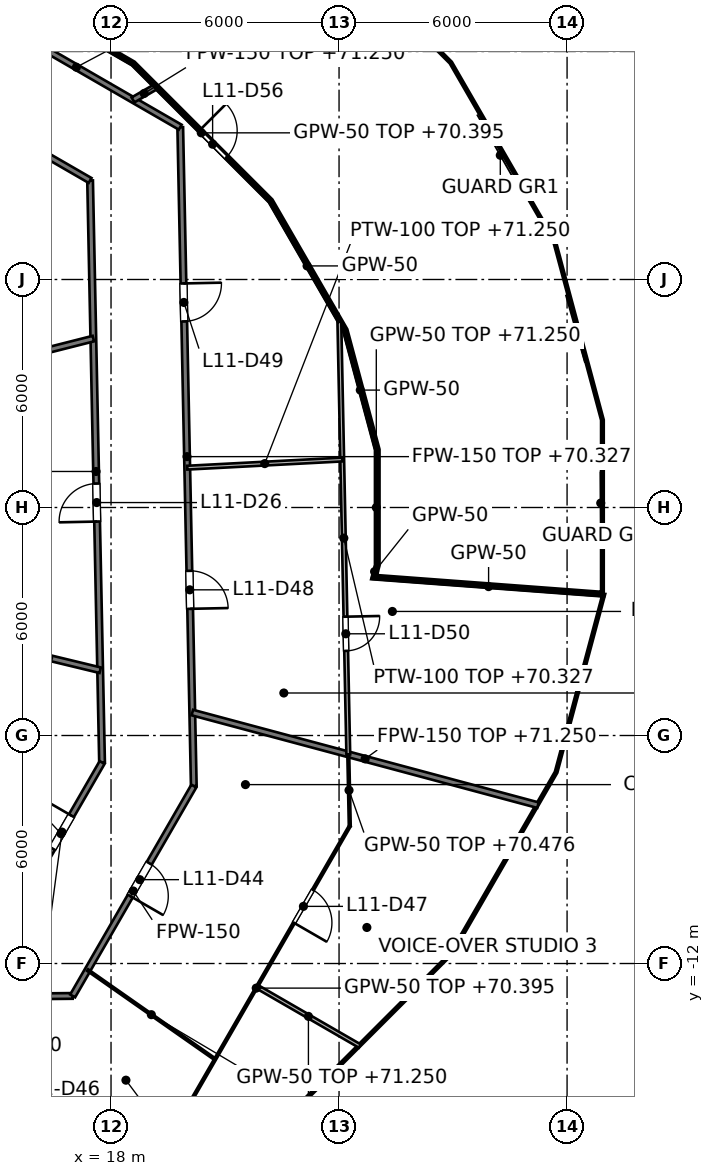
"""IFC4 building model, lengths in metres.
Left out: names, types, materials, properties, quantities, classifications, styles, units other than length and angle.
Written with IfcOpenShell. Run it as: python <this file> out.ifc"""

import sys

from ifc_helpers import new_model, si_unit, direction, frame, frame_2d, origin, place, context, subcontext, project, spatial, rectangle, extrude, element, fill, save


model = new_model("IFC4")
c1 = context("Model", 3, precision=1e-05, world=origin(), true_north=direction((0.0, 1.0)))
c2 = subcontext(c1, "Body", "Model", "MODEL_VIEW")
j1 = project(units=[si_unit("LENGTHUNIT", "METRE"), si_unit("PLANEANGLEUNIT", "RADIAN")], contexts=[c1])
p1 = place(None, origin())
s1 = spatial("IfcSite", under=j1, at=p1, CompositionType="ELEMENT")
p2 = place(p1, origin())
s2 = spatial("IfcBuilding", under=s1, at=p2, CompositionType="ELEMENT")
p3 = place(p2, frame((0.0, 0.0, 67.2)))
s3 = spatial("IfcBuildingStorey", under=s2, at=p3, CompositionType="ELEMENT", Elevation=67.2)
p4 = place(p3, frame((17.449, 8.606, 0.0), z_axis=(0.0, 0.0, 1.0), x_axis=(0.020558666055, -0.99978864829, 0.0)))
e1 = element("IfcWall", 1, at=p4, inside=s3, PredefinedType="PARTITIONING", context=c2, shape_type="SweptSolid", body=[
    extrude(rectangle(XDim=15.319, YDim=0.15, at=frame_2d((7.66, 0.0))), origin(), (0.0, 0.0, 1.0), 3.127),
])
p5 = place(p4, frame((7.978, 0.0, 0.0)))
e2 = element("IfcOpeningElement", 2, at=p5, cuts=e1, PredefinedType="OPENING", context=c2, shape_type="SweptSolid", body=[
    extrude(rectangle(XDim=1.0, YDim=2.1, at=frame_2d((0.5, 1.05))), frame((0.0, 0.075, 0.0), z_axis=(0.0, -1.0, 0.0), x_axis=(1.0, 0.0, 0.0)), (0.0, 0.0, 1.0), 0.15),
])
p6 = place(p3, frame((19.821, 10.008, 0.0), z_axis=(0.0, 0.0, 1.0), x_axis=(0.020552957546, -0.999788765658, 0.0)))
e3 = element("IfcWall", 3, at=p6, inside=s3, PredefinedType="PARTITIONING", context=c2, shape_type="SweptSolid", body=[
    extrude(rectangle(XDim=17.343, YDim=0.15, at=frame_2d((8.671, 0.0))), origin(), (0.0, 0.0, 1.0), 3.127),
])
p7 = place(p6, frame((11.677, 0.0, 0.0)))
e4 = element("IfcOpeningElement", 4, at=p7, cuts=e3, PredefinedType="OPENING", context=c2, shape_type="SweptSolid", body=[
    extrude(rectangle(XDim=1.0, YDim=2.1, at=frame_2d((0.5, 1.05))), frame((0.0, 0.075, 0.0), z_axis=(0.0, -1.0, 0.0), x_axis=(1.0, 0.0, 0.0)), (0.0, 0.0, 1.0), 0.15),
])
p8 = place(p6, frame((4.113, 0.0, 0.0)))
e5 = element("IfcOpeningElement", 5, at=p8, cuts=e3, PredefinedType="OPENING", context=c2, shape_type="SweptSolid", body=[
    extrude(rectangle(XDim=1.0, YDim=2.1, at=frame_2d((0.5, 1.05))), frame((0.0, 0.075, 0.0), z_axis=(0.0, -1.0, 0.0), x_axis=(1.0, 0.0, 0.0)), (0.0, 0.0, 1.0), 0.15),
])
p9 = place(p3, frame((13.724, 10.757, 0.0), z_axis=(0.0, 0.0, 1.0), x_axis=(0.86594264414, -0.500143316521, 0.0)))
e6 = element("IfcWall", 6, at=p9, inside=s3, PredefinedType="PARTITIONING", context=c2, shape_type="SweptSolid", body=[
    extrude(rectangle(XDim=4.302, YDim=0.15, at=frame_2d((2.151, 0.0))), origin(), (0.0, 0.0, 1.0), 3.195),
])
p10 = place(p9, frame((1.602, 0.0, 0.0)))
e7 = element("IfcOpeningElement", 7, at=p10, cuts=e6, PredefinedType="OPENING", context=c2, shape_type="SweptSolid", body=[
    extrude(rectangle(XDim=1.0, YDim=2.1, at=frame_2d((0.5, 1.05))), frame((0.0, 0.075, 0.0), z_axis=(0.0, -1.0, 0.0), x_axis=(1.0, 0.0, 0.0)), (0.0, 0.0, 1.0), 0.15),
])
p11 = place(p3, frame((14.356, 13.164, 0.0), z_axis=(0.0, 0.0, 1.0), x_axis=(0.865974907157, -0.500087452527, 0.0)))
e8 = element("IfcWall", 8, at=p11, inside=s3, PredefinedType="PARTITIONING", context=c2, shape_type="SweptSolid", body=[
    extrude(rectangle(XDim=6.311, YDim=0.15, at=frame_2d((3.155, 0.0))), origin(), (0.0, 0.0, 1.0), 3.195),
])
p12 = place(p11, frame((0.601, 0.0, 0.0)))
e9 = element("IfcOpeningElement", 9, at=p12, cuts=e8, PredefinedType="OPENING", context=c2, shape_type="SweptSolid", body=[
    extrude(rectangle(XDim=1.0, YDim=2.1, at=frame_2d((0.5, 1.05))), frame((0.0, 0.075, 0.0), z_axis=(0.0, -1.0, 0.0), x_axis=(1.0, 0.0, 0.0)), (0.0, 0.0, 1.0), 0.15),
])
p13 = place(p3, frame((20.139, -5.396, 0.0), z_axis=(0.0, 0.0, 1.0), x_axis=(0.965925251093, -0.258821191754, 0.0)))
e10 = element("IfcWall", 10, at=p13, inside=s3, PredefinedType="PARTITIONING", context=c2, shape_type="SweptSolid", body=[
    extrude(rectangle(XDim=9.416, YDim=0.15, at=frame_2d((4.708, 0.0))), origin(), (0.0, 0.0, 1.0), 4.05),
])
p14 = place(p3, frame((15.0, -3.626, 0.0), z_axis=(0.0, 0.0, 1.0), x_axis=(0.972005156389, -0.234959519818, 0.0)))
e11 = element("IfcWall", 11, at=p14, inside=s3, PredefinedType="PARTITIONING", context=c2, shape_type="SweptSolid", body=[
    extrude(rectangle(XDim=2.793, YDim=0.15, at=frame_2d((1.396, 0.0))), origin(), (0.0, 0.0, 1.0), 3.127),
])
p15 = place(p3, frame((-14.0, -13.16, 0.0), z_axis=(0.0, 0.0, 1.0), x_axis=(0.999950971812, 0.009902220598, 0.0)))
e12 = element("IfcWall", 12, at=p15, inside=s3, PredefinedType="PARTITIONING", context=c2, shape_type="SweptSolid", body=[
    extrude(rectangle(XDim=30.991, YDim=0.15, at=frame_2d((15.496, 0.0))), origin(), (0.0, 0.0, 1.0), 3.127),
])
p16 = place(p15, frame((6.643, 0.0, 0.0)))
e13 = element("IfcOpeningElement", 13, at=p16, cuts=e12, PredefinedType="OPENING", context=c2, shape_type="SweptSolid", body=[
    extrude(rectangle(XDim=1.0, YDim=2.1, at=frame_2d((0.5, 1.05))), frame((0.0, 0.075, 0.0), z_axis=(0.0, -1.0, 0.0), x_axis=(1.0, 0.0, 0.0)), (0.0, 0.0, 1.0), 0.15),
])
p17 = place(p15, frame((13.397, 0.0, 0.0)))
e14 = element("IfcOpeningElement", 14, at=p17, cuts=e12, PredefinedType="OPENING", context=c2, shape_type="SweptSolid", body=[
    extrude(rectangle(XDim=1.0, YDim=2.1, at=frame_2d((0.5, 1.05))), frame((0.0, 0.075, 0.0), z_axis=(0.0, -1.0, 0.0), x_axis=(1.0, 0.0, 0.0)), (0.0, 0.0, 1.0), 0.15),
])
p18 = place(p15, frame((15.816, 0.0, 0.0)))
e15 = element("IfcOpeningElement", 15, at=p18, cuts=e12, PredefinedType="OPENING", context=c2, shape_type="SweptSolid", body=[
    extrude(rectangle(XDim=1.0, YDim=2.1, at=frame_2d((0.5, 1.05))), frame((0.0, 0.075, 0.0), z_axis=(0.0, -1.0, 0.0), x_axis=(1.0, 0.0, 0.0)), (0.0, 0.0, 1.0), 0.15),
])
p19 = place(p15, frame((19.718, 0.0, 0.0)))
e16 = element("IfcOpeningElement", 16, at=p19, cuts=e12, PredefinedType="OPENING", context=c2, shape_type="SweptSolid", body=[
    extrude(rectangle(XDim=1.0, YDim=2.1, at=frame_2d((0.5, 1.05))), frame((0.0, 0.075, 0.0), z_axis=(0.0, -1.0, 0.0), x_axis=(1.0, 0.0, 0.0)), (0.0, 0.0, 1.0), 0.15),
])
p20 = place(p15, frame((23.479, 0.0, 0.0)))
e17 = element("IfcOpeningElement", 17, at=p20, cuts=e12, PredefinedType="OPENING", context=c2, shape_type="SweptSolid", body=[
    extrude(rectangle(XDim=1.0, YDim=2.1, at=frame_2d((0.5, 1.05))), frame((0.0, 0.075, 0.0), z_axis=(0.0, -1.0, 0.0), x_axis=(1.0, 0.0, 0.0)), (0.0, 0.0, 1.0), 0.15),
])
p21 = place(p3, frame((15.0, 3.802, 0.0), z_axis=(0.0, 0.0, 1.0), x_axis=(0.969340978535, 0.245719489117, 0.0)))
e18 = element("IfcWall", 18, at=p21, inside=s3, PredefinedType="PARTITIONING", context=c2, shape_type="SweptSolid", body=[
    extrude(rectangle(XDim=2.615, YDim=0.15, at=frame_2d((1.308, 0.0))), origin(), (0.0, 0.0, 1.0), 4.05),
])
p22 = place(p3, frame((18.578, 10.726, 0.0), z_axis=(0.0, 0.0, 1.0), x_axis=(0.866203514255, 0.499691376644, 0.0)))
e19 = element("IfcWall", 19, at=p22, inside=s3, PredefinedType="PARTITIONING", context=c2, shape_type="SweptSolid", body=[
    extrude(rectangle(XDim=0.68, YDim=0.15, at=frame_2d((0.34, 0.0))), origin(), (0.0, 0.0, 1.0), 4.05),
])
p23 = place(p3, frame((16.99, -12.853, 0.0), z_axis=(0.0, 0.0, 1.0), x_axis=(0.500026252906, 0.866010246132, 0.0)))
e20 = element("IfcWall", 20, at=p23, inside=s3, PredefinedType="PARTITIONING", context=c2, shape_type="SweptSolid", body=[
    extrude(rectangle(XDim=6.377, YDim=0.15, at=frame_2d((3.188, 0.0))), origin(), (0.0, 0.0, 1.0), 3.195),
])
p24 = place(p23, frame((3.033, 0.0, 0.0)))
e21 = element("IfcOpeningElement", 21, at=p24, cuts=e20, PredefinedType="OPENING", context=c2, shape_type="SweptSolid", body=[
    extrude(rectangle(XDim=1.0, YDim=2.1, at=frame_2d((0.5, 1.05))), frame((0.0, 0.075, 0.0), z_axis=(0.0, -1.0, 0.0), x_axis=(1.0, 0.0, 0.0)), (0.0, 0.0, 1.0), 0.15),
])
p25 = place(p3, frame((15.602, -10.457, 0.0), z_axis=(0.0, 0.0, 1.0), x_axis=(0.500017157925, 0.866015497425, 0.0)))
e22 = element("IfcWall", 22, at=p25, inside=s3, PredefinedType="PARTITIONING", context=c2, shape_type="SweptSolid", body=[
    extrude(rectangle(XDim=4.326, YDim=0.15, at=frame_2d((2.163, 0.0))), origin(), (0.0, 0.0, 1.0), 3.195),
])
p26 = place(p25, frame((1.712, 0.0, 0.0)))
e23 = element("IfcOpeningElement", 23, at=p26, cuts=e22, PredefinedType="OPENING", context=c2, shape_type="SweptSolid", body=[
    extrude(rectangle(XDim=1.0, YDim=2.1, at=frame_2d((0.5, 1.05))), frame((0.0, 0.075, 0.0), z_axis=(0.0, -1.0, 0.0), x_axis=(1.0, 0.0, 0.0)), (0.0, 0.0, 1.0), 0.15),
])
p27 = place(p3, frame((24.243, -6.496, 0.0), z_axis=(0.0, 0.0, 1.0), x_axis=(0.020675429556, -0.99978624046, 0.0)))
e24 = element("IfcWall", 24, at=p27, inside=s3, PredefinedType="PARTITIONING", context=c2, shape_type="SweptSolid", body=[
    extrude(rectangle(XDim=1.889, YDim=0.05, at=frame_2d((0.945, 0.0))), origin(), (0.0, 0.0, 1.0), 3.276),
])
p28 = place(p3, frame((24.138, 4.66, 0.0), z_axis=(0.0, 0.0, 1.0), x_axis=(0.258947488639, -0.965891400794, 0.0)))
e25 = element("IfcWall", 25, at=p28, inside=s3, PredefinedType="PARTITIONING", context=c2, shape_type="SweptSolid", body=[
    extrude(rectangle(XDim=3.252, YDim=0.05, at=frame_2d((1.626, 0.0))), origin(), (0.0, 0.0, 1.0), 3.127),
])
p29 = place(p3, frame((22.179, 8.054, 0.0), z_axis=(0.0, 0.0, 1.0), x_axis=(0.500038841519, -0.866002977462, 0.0)))
e26 = element("IfcWall", 26, at=p29, inside=s3, PredefinedType="PARTITIONING", context=c2, shape_type="SweptSolid", body=[
    extrude(rectangle(XDim=3.919, YDim=0.05, at=frame_2d((1.959, 0.0))), origin(), (0.0, 0.0, 1.0), 3.127),
])
p30 = place(p3, frame((18.569, 11.664, 0.0), z_axis=(0.0, 0.0, 1.0), x_axis=(0.707082870229, -0.707130691335, 0.0)))
e27 = element("IfcWall", 27, at=p30, inside=s3, PredefinedType="PARTITIONING", context=c2, shape_type="SweptSolid", body=[
    extrude(rectangle(XDim=5.105, YDim=0.05, at=frame_2d((2.553, 0.0))), origin(), (0.0, 0.0, 1.0), 3.195),
])
p31 = place(p30, frame((2.476, 0.0, 0.0)))
e28 = element("IfcOpeningElement", 28, at=p31, cuts=e27, PredefinedType="OPENING", context=c2, shape_type="SweptSolid", body=[
    extrude(rectangle(XDim=1.0, YDim=2.1, at=frame_2d((0.5, 1.05))), frame((0.0, 0.025, 0.0), z_axis=(0.0, -1.0, 0.0), x_axis=(1.0, 0.0, 0.0)), (0.0, 0.0, 1.0), 0.05),
])
p32 = place(p3, frame((17.383, -12.172, 0.0), z_axis=(0.0, 0.0, 1.0), x_axis=(0.819265519274, -0.573414343149, 0.0)))
e29 = element("IfcWall", 29, at=p32, inside=s3, PredefinedType="PARTITIONING", context=c2, shape_type="SweptSolid", body=[
    extrude(rectangle(XDim=4.096, YDim=0.05, at=frame_2d((2.048, 0.0))), origin(), (0.0, 0.0, 1.0), 4.05),
])
p33 = place(p3, frame((16.993, 12.574, 0.0), z_axis=(0.0, 0.0, 1.0), x_axis=(0.866047089031, -0.499962438169, 0.0)))
e30 = element("IfcWall", 30, at=p33, inside=s3, PredefinedType="PARTITIONING", context=c2, shape_type="SweptSolid", body=[
    extrude(rectangle(XDim=1.82, YDim=0.05, at=frame_2d((0.91, 0.0))), origin(), (0.0, 0.0, 1.0), 3.195),
])
p34 = place(p3, frame((24.89, -1.855, 0.0), z_axis=(0.0, 0.0, 1.0), x_axis=(0.997231640207, -0.074357620797, 0.0)))
e31 = element("IfcWall", 31, at=p34, inside=s3, PredefinedType="PARTITIONING", context=c2, shape_type="SweptSolid", body=[
    extrude(rectangle(XDim=6.107, YDim=0.05, at=frame_2d((3.053, 0.0))), origin(), (0.0, 0.0, 1.0), 3.127),
])
p35 = place(p3, frame((19.359, -16.91, 0.0), z_axis=(0.0, 0.0, 1.0), x_axis=(0.500075948794, 0.865981550287, 0.0)))
e32 = element("IfcWall", 32, at=p35, inside=s3, PredefinedType="PARTITIONING", context=c2, shape_type="SweptSolid", body=[
    extrude(rectangle(XDim=9.844, YDim=0.05, at=frame_2d((4.922, 0.0))), origin(), (0.0, 0.0, 1.0), 3.195),
])
p36 = place(p35, frame((6.906, 0.0, 0.0)))
e33 = element("IfcOpeningElement", 33, at=p36, cuts=e32, PredefinedType="OPENING", context=c2, shape_type="SweptSolid", body=[
    extrude(rectangle(XDim=1.0, YDim=2.1, at=frame_2d((0.5, 1.05))), frame((0.0, 0.025, 0.0), z_axis=(0.0, -1.0, 0.0), x_axis=(1.0, 0.0, 0.0)), (0.0, 0.0, 1.0), 0.05),
])
p37 = place(p3, frame((24.89, -1.855, 0.0), z_axis=(0.0, 0.0, 1.0), x_axis=(0.259016767744, 0.965872824976, 0.0)))
e34 = element("IfcWall", 34, at=p37, inside=s3, PredefinedType="PARTITIONING", context=c2, shape_type="SweptSolid", body=[
    extrude(rectangle(XDim=0.348, YDim=0.05, at=frame_2d((0.174, 0.0))), origin(), (0.0, 0.0, 1.0), 3.127),
])
p38 = place(p3, frame((24.98, -1.519, 0.0), z_axis=(0.0, 0.0, 1.0), x_axis=(0.0, 1.0, 0.0)))
e35 = element("IfcWall", 35, at=p38, inside=s3, PredefinedType="PARTITIONING", context=c2, shape_type="SweptSolid", body=[
    extrude(rectangle(XDim=3.038, YDim=0.05, at=frame_2d((1.519, 0.0))), origin(), (0.0, 0.0, 1.0), 4.05),
])
p39 = place(p3, frame((24.008, 4.885, 0.0), z_axis=(0.0, 0.0, 1.0), x_axis=(0.020653293652, -0.999786697982, 0.0)))
e36 = element("IfcWall", 36, at=p39, inside=s3, PredefinedType="PARTITIONING", context=c2, shape_type="SweptSolid", body=[
    extrude(rectangle(XDim=11.384, YDim=0.1, at=frame_2d((5.692, 0.0))), origin(), (0.0, 0.0, 1.0), 3.127),
])
p40 = place(p39, frame((7.76, 0.0, 0.0)))
e37 = element("IfcOpeningElement", 37, at=p40, cuts=e36, PredefinedType="OPENING", context=c2, shape_type="SweptSolid", body=[
    extrude(rectangle(XDim=0.9, YDim=2.1, at=frame_2d((0.45, 1.05))), frame((0.0, 0.05, 0.0), z_axis=(0.0, -1.0, 0.0), x_axis=(1.0, 0.0, 0.0)), (0.0, 0.0, 1.0), 0.1),
])
p41 = place(p3, frame((21.842, -12.61, 0.0), z_axis=(0.0, 0.0, 1.0), x_axis=(0.865948598564, -0.500133006953, 0.0)))
e38 = element("IfcWall", 38, at=p41, inside=s3, PredefinedType="PARTITIONING", context=c2, shape_type="SweptSolid", body=[
    extrude(rectangle(XDim=3.123, YDim=0.1, at=frame_2d((1.562, 0.0))), origin(), (0.0, 0.0, 1.0), 3.352),
])
p42 = place(p3, frame((20.006, 1.048, 0.0), z_axis=(0.0, 0.0, 1.0), x_axis=(0.998626900289, 0.05238620065, 0.0)))
e39 = element("IfcWall", 39, at=p42, inside=s3, PredefinedType="PARTITIONING", context=c2, shape_type="SweptSolid", body=[
    extrude(rectangle(XDim=4.083, YDim=0.1, at=frame_2d((2.041, 0.0))), origin(), (0.0, 0.0, 1.0), 4.05),
])
p43 = place(p26, origin())
e40 = element("IfcDoor", 40, at=p43, inside=s3, OperationType="SINGLE_SWING_RIGHT", PredefinedType="DOOR", context=c2, shape_type="SweptSolid", body=[
    extrude(rectangle(XDim=1.0, YDim=2.1, at=frame_2d((0.5, 1.05))), frame((0.0, 0.025, 0.0), z_axis=(0.0, -1.0, 0.0), x_axis=(1.0, 0.0, 0.0)), (0.0, 0.0, 1.0), 0.05),
])
fill(e23, e40)
p44 = place(p5, origin())
e41 = element("IfcDoor", 41, at=p44, inside=s3, OperationType="SINGLE_SWING_RIGHT", PredefinedType="DOOR", context=c2, shape_type="SweptSolid", body=[
    extrude(rectangle(XDim=1.0, YDim=2.1, at=frame_2d((0.5, 1.05))), frame((0.0, 0.025, 0.0), z_axis=(0.0, -1.0, 0.0), x_axis=(1.0, 0.0, 0.0)), (0.0, 0.0, 1.0), 0.05),
])
fill(e2, e41)
p45 = place(p24, origin())
e42 = element("IfcDoor", 42, at=p45, inside=s3, OperationType="SINGLE_SWING_LEFT", PredefinedType="DOOR", context=c2, shape_type="SweptSolid", body=[
    extrude(rectangle(XDim=1.0, YDim=2.1, at=frame_2d((0.5, 1.05))), frame((0.0, 0.025, 0.0), z_axis=(0.0, -1.0, 0.0), x_axis=(1.0, 0.0, 0.0)), (0.0, 0.0, 1.0), 0.05),
])
fill(e21, e42)
p46 = place(p36, origin())
e43 = element("IfcDoor", 43, at=p46, inside=s3, OperationType="SINGLE_SWING_LEFT", PredefinedType="DOOR", context=c2, shape_type="SweptSolid", body=[
    extrude(rectangle(XDim=1.0, YDim=2.1, at=frame_2d((0.5, 1.05))), frame((0.0, 0.025, 0.0), z_axis=(0.0, -1.0, 0.0), x_axis=(1.0, 0.0, 0.0)), (0.0, 0.0, 1.0), 0.05),
])
fill(e33, e43)
p47 = place(p7, origin())
e44 = element("IfcDoor", 44, at=p47, inside=s3, OperationType="SINGLE_SWING_RIGHT", PredefinedType="DOOR", context=c2, shape_type="SweptSolid", body=[
    extrude(rectangle(XDim=1.0, YDim=2.1, at=frame_2d((0.5, 1.05))), frame((0.0, 0.025, 0.0), z_axis=(0.0, -1.0, 0.0), x_axis=(1.0, 0.0, 0.0)), (0.0, 0.0, 1.0), 0.05),
])
fill(e4, e44)
p48 = place(p8, origin())
e45 = element("IfcDoor", 45, at=p48, inside=s3, OperationType="SINGLE_SWING_LEFT", PredefinedType="DOOR", context=c2, shape_type="SweptSolid", body=[
    extrude(rectangle(XDim=1.0, YDim=2.1, at=frame_2d((0.5, 1.05))), frame((0.0, 0.025, 0.0), z_axis=(0.0, -1.0, 0.0), x_axis=(1.0, 0.0, 0.0)), (0.0, 0.0, 1.0), 0.05),
])
fill(e5, e45)
p49 = place(p40, origin())
e46 = element("IfcDoor", 46, at=p49, inside=s3, OperationType="SINGLE_SWING_LEFT", PredefinedType="DOOR", context=c2, shape_type="SweptSolid", body=[
    extrude(rectangle(XDim=0.9, YDim=2.1, at=frame_2d((0.45, 1.05))), frame((0.0, 0.025, 0.0), z_axis=(0.0, -1.0, 0.0), x_axis=(1.0, 0.0, 0.0)), (0.0, 0.0, 1.0), 0.05),
])
fill(e37, e46)
p50 = place(p31, origin())
e47 = element("IfcDoor", 47, at=p50, inside=s3, OperationType="SINGLE_SWING_LEFT", PredefinedType="DOOR", context=c2, shape_type="SweptSolid", body=[
    extrude(rectangle(XDim=1.0, YDim=2.1, at=frame_2d((0.5, 1.05))), frame((0.0, 0.025, 0.0), z_axis=(0.0, -1.0, 0.0), x_axis=(1.0, 0.0, 0.0)), (0.0, 0.0, 1.0), 0.05),
])
fill(e28, e47)
save(model, sys.argv[1])
